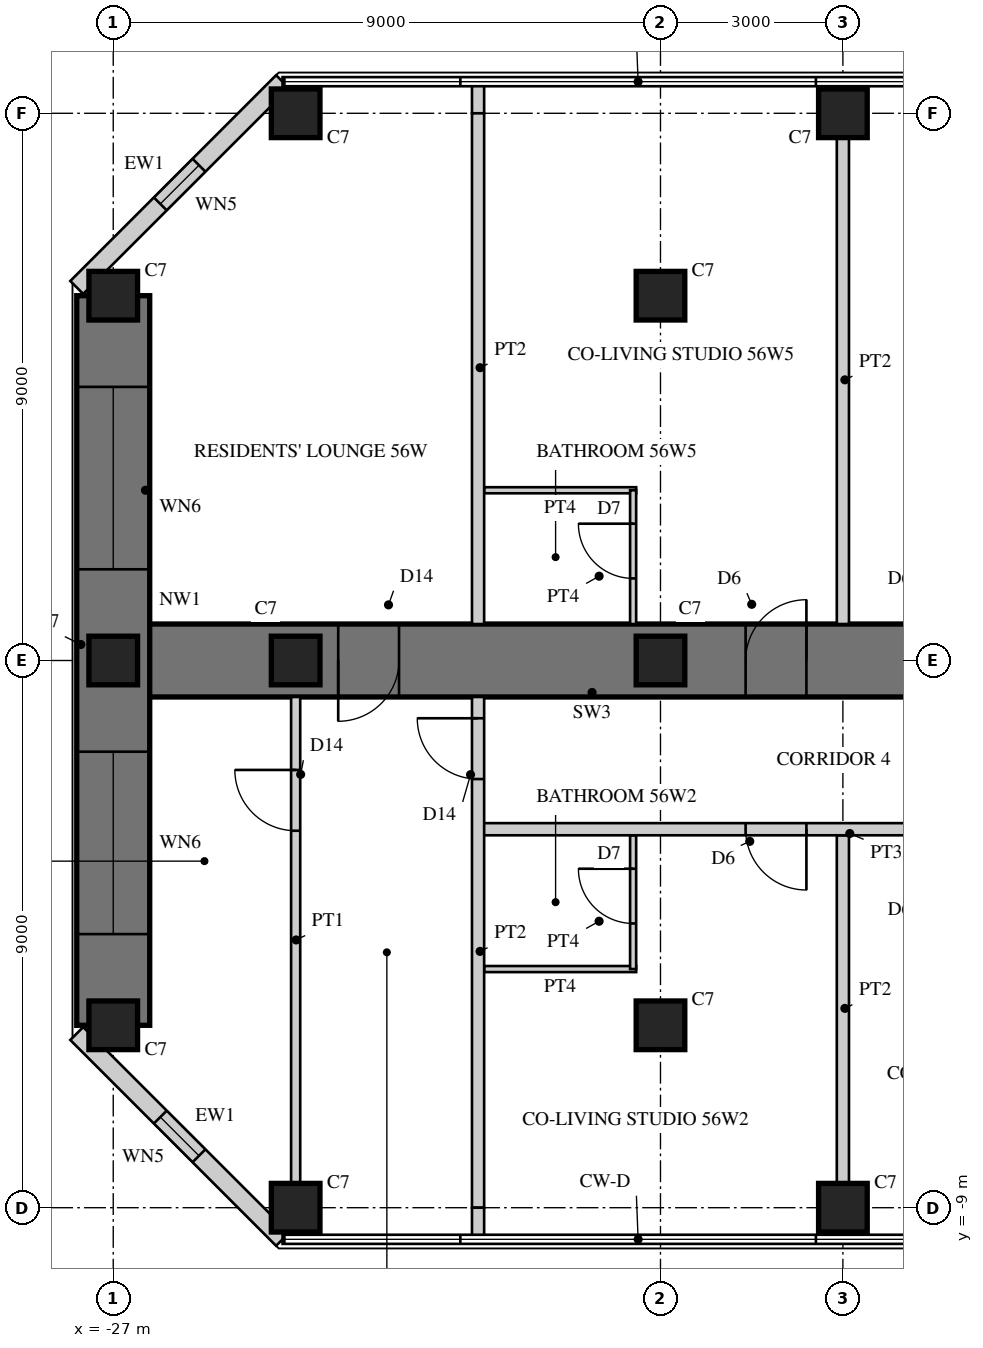
"""IFC4 building model, lengths in metres.
Left out: names, types, materials, properties, quantities, classifications, styles, units other than length and angle.
Written with IfcOpenShell. Run it as: python <this file> out.ifc"""

import sys

from ifc_helpers import new_model, si_unit, direction, frame, frame_2d, origin, origin_2d, place, context, subcontext, project, spatial, rectangle, hollow_rectangle, extrude, element, fill, save


model = new_model("IFC4")
c1 = context("Model", 3, precision=1e-05, world=origin(), true_north=direction((0.0, 1.0)))
c2 = subcontext(c1, "Body", "Model", "MODEL_VIEW")
j1 = project(units=[si_unit("LENGTHUNIT", "METRE"), si_unit("PLANEANGLEUNIT", "RADIAN")], contexts=[c1])
p1 = place(None, origin())
s1 = spatial("IfcSite", under=j1, at=p1, CompositionType="ELEMENT")
p2 = place(p1, origin())
s2 = spatial("IfcBuilding", under=s1, at=p2, CompositionType="ELEMENT")
p3 = place(p2, frame((0.0, 0.0, 222.1)))
s3 = spatial("IfcBuildingStorey", under=s2, at=p3, CompositionType="ELEMENT", Elevation=222.1)
p4 = place(p3, frame((-9.0, 0.0, 0.0), z_axis=(0.0, 0.0, 1.0), x_axis=(-1.0, 0.0, 0.0)))
e1 = element("IfcWall", 1, at=p4, inside=s3, PredefinedType="SHEAR", context=c2, shape_type="SweptSolid", body=[
    extrude(rectangle(XDim=18.0, YDim=1.2, at=frame_2d((9.0, 0.0))), origin(), (0.0, 0.0, 1.0), 3.4),
])
p5 = place(p4, frame((3.8, 0.0, 0.0)))
e2 = element("IfcOpeningElement", 2, at=p5, cuts=e1, PredefinedType="OPENING", context=c2, shape_type="SweptSolid", body=[
    extrude(rectangle(XDim=1.0, YDim=2.15, at=frame_2d((0.5, 1.075))), frame((0.0, 0.61, 0.0), z_axis=(0.0, -1.0, 0.0), x_axis=(1.0, 0.0, 0.0)), (0.0, 0.0, 1.0), 1.22),
])
p6 = place(p4, frame((6.6, 0.0, 0.0)))
e3 = element("IfcOpeningElement", 3, at=p6, cuts=e1, PredefinedType="OPENING", context=c2, shape_type="SweptSolid", body=[
    extrude(rectangle(XDim=1.0, YDim=2.15, at=frame_2d((0.5, 1.075))), frame((0.0, 0.61, 0.0), z_axis=(0.0, -1.0, 0.0), x_axis=(1.0, 0.0, 0.0)), (0.0, 0.0, 1.0), 1.22),
])
p7 = place(p4, frame((13.3, 0.0, 0.0)))
e4 = element("IfcOpeningElement", 4, at=p7, cuts=e1, PredefinedType="OPENING", context=c2, shape_type="SweptSolid", body=[
    extrude(rectangle(XDim=1.0, YDim=2.2, at=frame_2d((0.5, 1.1))), frame((0.0, 0.61, 0.0), z_axis=(0.0, -1.0, 0.0), x_axis=(1.0, 0.0, 0.0)), (0.0, 0.0, 1.0), 1.22),
])
p8 = place(p3, frame((-27.0, 6.0, 0.0), z_axis=(0.0, 0.0, 1.0), x_axis=(0.0, -1.0, 0.0)))
e5 = element("IfcWall", 5, at=p8, inside=s3, PredefinedType="SHEAR", context=c2, shape_type="SweptSolid", body=[
    extrude(rectangle(XDim=12.0, YDim=1.2, at=frame_2d((6.0, 0.0))), origin(), (0.0, 0.0, 1.0), 3.4),
])
p9 = place(p8, frame((1.5, 0.0, 0.6)))
e6 = element("IfcOpeningElement", 6, at=p9, cuts=e5, PredefinedType="OPENING", context=c2, shape_type="SweptSolid", body=[
    extrude(rectangle(XDim=3.0, YDim=2.4, at=frame_2d((1.5, 1.2))), frame((0.0, 0.61, 0.0), z_axis=(0.0, -1.0, 0.0), x_axis=(1.0, 0.0, 0.0)), (0.0, 0.0, 1.0), 1.22),
])
p10 = place(p8, frame((7.5, 0.0, 0.6)))
e7 = element("IfcOpeningElement", 7, at=p10, cuts=e5, PredefinedType="OPENING", context=c2, shape_type="SweptSolid", body=[
    extrude(rectangle(XDim=3.0, YDim=2.4, at=frame_2d((1.5, 1.2))), frame((0.0, 0.61, 0.0), z_axis=(0.0, -1.0, 0.0), x_axis=(1.0, 0.0, 0.0)), (0.0, 0.0, 1.0), 1.22),
])
for number, where, z_axis, x_axis in (
    (8, (-15.0, 9.0, 0.0), (0.0, 0.0, 1.0), (1.0, 0.0, 0.0)),
    (9, (-24.0, 9.0, 0.0), (0.0, 0.0, 1.0), (1.0, 0.0, 0.0)),
    (10, (-15.0, -9.0, 0.0), (0.0, 0.0, 1.0), (1.0, 0.0, 0.0)),
    (11, (-24.0, -9.0, 0.0), (0.0, 0.0, 1.0), (1.0, 0.0, 0.0)),
    (12, (-27.0, 6.0, 0.0), (0.0, 0.0, 1.0), (1.0, 0.0, 0.0)),
    (13, (-27.0, 0.0, 0.0), (0.0, 0.0, 1.0), (1.0, 0.0, 0.0)),
    (14, (-27.0, -6.0, 0.0), (0.0, 0.0, 1.0), (1.0, 0.0, 0.0)),
    (15, (-18.0, 6.0, 0.0), (0.0, 0.0, 1.0), (1.0, 0.0, 0.0)),
    (16, (-18.0, 0.0, 0.0), (0.0, 0.0, 1.0), (1.0, 0.0, 0.0)),
    (17, (-18.0, -6.0, 0.0), (0.0, 0.0, 1.0), (1.0, 0.0, 0.0)),
    (18, (-24.0, 0.0, 0.0), (0.0, 0.0, 1.0), (1.0, 0.0, 0.0)),
):
    element("IfcColumn", number, at=place(p3, frame(where, z_axis=z_axis, x_axis=x_axis)), inside=s3, PredefinedType="COLUMN", context=c2, shape_type="SweptSolid", body=[
        extrude(rectangle(XDim=0.8, YDim=0.8, at=origin_2d()), origin(), (0.0, 0.0, 1.0), 3.4),
    ])
p11 = place(p3, frame((-24.215, 9.52, 0.0), z_axis=(0.0, 0.0, 1.0), x_axis=(-0.707132283189, -0.707081278264, 0.0)))
e19 = element("IfcWall", 19, at=p11, inside=s3, PredefinedType="SOLIDWALL", context=c2, shape_type="SweptSolid", body=[
    extrude(rectangle(XDim=4.787, YDim=0.3, at=frame_2d((2.393, 0.0))), origin(), (0.0, 0.0, 1.0), 3.22),
])
p12 = place(p11, frame((1.943, 0.0, 0.3)))
e20 = element("IfcOpeningElement", 20, at=p12, cuts=e19, PredefinedType="OPENING", context=c2, shape_type="SweptSolid", body=[
    extrude(rectangle(XDim=0.9, YDim=2.4, at=frame_2d((0.45, 1.2))), frame((0.0, 0.16, 0.0), z_axis=(0.0, -1.0, 0.0), x_axis=(1.0, 0.0, 0.0)), (0.0, 0.0, 1.0), 0.32),
])
p13 = place(p3, frame((-27.6, -6.135, 0.0), z_axis=(0.0, 0.0, 1.0), x_axis=(0.707132283189, -0.707081278264, 0.0)))
e21 = element("IfcWall", 21, at=p13, inside=s3, PredefinedType="SOLIDWALL", context=c2, shape_type="SweptSolid", body=[
    extrude(rectangle(XDim=4.787, YDim=0.3, at=frame_2d((2.393, 0.0))), origin(), (0.0, 0.0, 1.0), 3.22),
])
p14 = place(p13, frame((1.943, 0.0, 0.3)))
e22 = element("IfcOpeningElement", 22, at=p14, cuts=e21, PredefinedType="OPENING", context=c2, shape_type="SweptSolid", body=[
    extrude(rectangle(XDim=0.9, YDim=2.4, at=frame_2d((0.45, 1.2))), frame((0.0, 0.16, 0.0), z_axis=(0.0, -1.0, 0.0), x_axis=(1.0, 0.0, 0.0)), (0.0, 0.0, 1.0), 0.32),
])
p15 = place(p3, frame((-15.0, -2.875, 0.0), z_axis=(0.0, 0.0, 1.0), x_axis=(0.0, -1.0, 0.0)))
e23 = element("IfcWall", 23, at=p15, inside=s3, PredefinedType="SOLIDWALL", context=c2, shape_type="SweptSolid", body=[
    extrude(rectangle(XDim=5.725, YDim=0.2, at=frame_2d((2.863, 0.0))), origin(), (0.0, 0.0, 1.0), 2.52),
])
p16 = place(p3, frame((-15.0, 8.6, 0.0), z_axis=(0.0, 0.0, 1.0), x_axis=(0.0, -1.0, 0.0)))
e24 = element("IfcWall", 24, at=p16, inside=s3, PredefinedType="SOLIDWALL", context=c2, shape_type="SweptSolid", body=[
    extrude(rectangle(XDim=8.0, YDim=0.2, at=frame_2d((4.0, 0.0))), origin(), (0.0, 0.0, 1.0), 2.52),
])
p17 = place(p3, frame((-18.4, -5.075, 0.0), z_axis=(0.0, 0.0, 1.0), x_axis=(-1.0, 0.0, 0.0)))
e25 = element("IfcWall", 25, at=p17, inside=s3, PredefinedType="PARTITIONING", context=c2, shape_type="SweptSolid", body=[
    extrude(rectangle(XDim=2.5, YDim=0.1, at=frame_2d((1.25, 0.0))), origin(), (0.0, 0.0, 1.0), 3.22),
])
p18 = place(p3, frame((-18.45, -2.875, 0.0), z_axis=(0.0, 0.0, 1.0), x_axis=(0.0, -1.0, 0.0)))
e26 = element("IfcWall", 26, at=p18, inside=s3, PredefinedType="PARTITIONING", context=c2, shape_type="SweptSolid", body=[
    extrude(rectangle(XDim=2.2, YDim=0.1, at=frame_2d((1.1, 0.0))), origin(), (0.0, 0.0, 1.0), 3.22),
])
p19 = place(p18, frame((0.55, 0.0, 0.0)))
e27 = element("IfcOpeningElement", 27, at=p19, cuts=e26, PredefinedType="OPENING", context=c2, shape_type="SweptSolid", body=[
    extrude(rectangle(XDim=0.9, YDim=2.1, at=frame_2d((0.45, 1.05))), frame((0.0, 0.06, 0.0), z_axis=(0.0, -1.0, 0.0), x_axis=(1.0, 0.0, 0.0)), (0.0, 0.0, 1.0), 0.12),
])
p20 = place(p3, frame((-18.4, 2.8, 0.0), z_axis=(0.0, 0.0, 1.0), x_axis=(-1.0, 0.0, 0.0)))
e28 = element("IfcWall", 28, at=p20, inside=s3, PredefinedType="PARTITIONING", context=c2, shape_type="SweptSolid", body=[
    extrude(rectangle(XDim=2.5, YDim=0.1, at=frame_2d((1.25, 0.0))), origin(), (0.0, 0.0, 1.0), 3.22),
])
p21 = place(p3, frame((-18.45, 2.8, 0.0), z_axis=(0.0, 0.0, 1.0), x_axis=(0.0, -1.0, 0.0)))
e29 = element("IfcWall", 29, at=p21, inside=s3, PredefinedType="PARTITIONING", context=c2, shape_type="SweptSolid", body=[
    extrude(rectangle(XDim=2.2, YDim=0.1, at=frame_2d((1.1, 0.0))), origin(), (0.0, 0.0, 1.0), 3.22),
])
p22 = place(p21, frame((0.55, 0.0, 0.0)))
e30 = element("IfcOpeningElement", 30, at=p22, cuts=e29, PredefinedType="OPENING", context=c2, shape_type="SweptSolid", body=[
    extrude(rectangle(XDim=0.9, YDim=2.1, at=frame_2d((0.45, 1.05))), frame((0.0, 0.06, 0.0), z_axis=(0.0, -1.0, 0.0), x_axis=(1.0, 0.0, 0.0)), (0.0, 0.0, 1.0), 0.12),
])
p23 = place(p3, frame((-9.4, -2.775, 0.0), z_axis=(0.0, 0.0, 1.0), x_axis=(-1.0, 0.0, 0.0)))
e31 = element("IfcWall", 31, at=p23, inside=s3, PredefinedType="SOLIDWALL", context=c2, shape_type="SweptSolid", body=[
    extrude(rectangle(XDim=11.6, YDim=0.2, at=frame_2d((5.8, 0.0))), origin(), (0.0, 0.0, 1.0), 3.22),
])
p24 = place(p23, frame((3.4, 0.0, 0.0)))
e32 = element("IfcOpeningElement", 32, at=p24, cuts=e31, PredefinedType="OPENING", context=c2, shape_type="SweptSolid", body=[
    extrude(rectangle(XDim=1.0, YDim=2.15, at=frame_2d((0.5, 1.075))), frame((0.0, 0.11, 0.0), z_axis=(0.0, -1.0, 0.0), x_axis=(1.0, 0.0, 0.0)), (0.0, 0.0, 1.0), 0.22),
])
p25 = place(p23, frame((6.2, 0.0, 0.0)))
e33 = element("IfcOpeningElement", 33, at=p25, cuts=e31, PredefinedType="OPENING", context=c2, shape_type="SweptSolid", body=[
    extrude(rectangle(XDim=1.0, YDim=2.15, at=frame_2d((0.5, 1.075))), frame((0.0, 0.11, 0.0), z_axis=(0.0, -1.0, 0.0), x_axis=(1.0, 0.0, 0.0)), (0.0, 0.0, 1.0), 0.22),
])
p26 = place(p3, frame((-24.0, -0.6, 0.0), z_axis=(0.0, 0.0, 1.0), x_axis=(0.0, -1.0, 0.0)))
e34 = element("IfcWall", 34, at=p26, inside=s3, PredefinedType="PARTITIONING", context=c2, shape_type="SweptSolid", body=[
    extrude(rectangle(XDim=8.0, YDim=0.15, at=frame_2d((4.0, 0.0))), origin(), (0.0, 0.0, 1.0), 2.52),
])
p27 = place(p26, frame((1.2, 0.0, 0.0)))
e35 = element("IfcOpeningElement", 35, at=p27, cuts=e34, PredefinedType="OPENING", context=c2, shape_type="SweptSolid", body=[
    extrude(rectangle(XDim=1.0, YDim=2.2, at=frame_2d((0.5, 1.1))), frame((0.0, 0.085, 0.0), z_axis=(0.0, -1.0, 0.0), x_axis=(1.0, 0.0, 0.0)), (0.0, 0.0, 1.0), 0.17),
])
p28 = place(p3, frame((-21.0, 9.48, 0.0), z_axis=(0.0, 0.0, 1.0), x_axis=(0.0, -1.0, 0.0)))
e36 = element("IfcWall", 36, at=p28, inside=s3, PredefinedType="SOLIDWALL", context=c2, shape_type="SweptSolid", body=[
    extrude(rectangle(XDim=0.48, YDim=0.2, at=frame_2d((0.24, 0.0))), origin(), (0.0, 0.0, 1.0), 3.22),
])
p29 = place(p3, frame((-21.0, 9.0, 0.0), z_axis=(0.0, 0.0, 1.0), x_axis=(0.0, -1.0, 0.0)))
e37 = element("IfcWall", 37, at=p29, inside=s3, PredefinedType="SOLIDWALL", context=c2, shape_type="SweptSolid", body=[
    extrude(rectangle(XDim=8.4, YDim=0.2, at=frame_2d((4.2, 0.0))), origin(), (0.0, 0.0, 1.0), 2.67),
])
p30 = place(p3, frame((-21.0, -0.6, 0.0), z_axis=(0.0, 0.0, 1.0), x_axis=(0.0, -1.0, 0.0)))
e38 = element("IfcWall", 38, at=p30, inside=s3, PredefinedType="SOLIDWALL", context=c2, shape_type="SweptSolid", body=[
    extrude(rectangle(XDim=8.4, YDim=0.2, at=frame_2d((4.2, 0.0))), origin(), (0.0, 0.0, 1.0), 2.67),
])
p31 = place(p30, frame((0.35, 0.0, 0.0)))
e39 = element("IfcOpeningElement", 39, at=p31, cuts=e38, PredefinedType="OPENING", context=c2, shape_type="SweptSolid", body=[
    extrude(rectangle(XDim=1.0, YDim=2.2, at=frame_2d((0.5, 1.1))), frame((0.0, 0.11, 0.0), z_axis=(0.0, -1.0, 0.0), x_axis=(1.0, 0.0, 0.0)), (0.0, 0.0, 1.0), 0.22),
])
p32 = place(p3, frame((-21.0, -9.0, 0.0), z_axis=(0.0, 0.0, 1.0), x_axis=(0.0, -1.0, 0.0)))
e40 = element("IfcWall", 40, at=p32, inside=s3, PredefinedType="SOLIDWALL", context=c2, shape_type="SweptSolid", body=[
    extrude(rectangle(XDim=0.48, YDim=0.2, at=frame_2d((0.24, 0.0))), origin(), (0.0, 0.0, 1.0), 3.22),
])
p33 = place(p12, origin())
e41 = element("IfcWindow", 41, at=p33, inside=s3, PartitioningType="SINGLE_PANEL", PredefinedType="WINDOW", context=c2, shape_type="SweptSolid", body=[
    extrude(hollow_rectangle(XDim=0.9, YDim=2.4, WallThickness=0.06, at=frame_2d((0.45, 1.2))), frame((0.0, 0.03, 0.0), z_axis=(0.0, -1.0, 0.0), x_axis=(1.0, 0.0, 0.0)), (0.0, 0.0, 1.0), 0.06),
    extrude(rectangle(XDim=0.779, YDim=2.279, at=frame_2d((0.45, 1.2))), frame((0.0, 0.03, 0.0), z_axis=(0.0, -1.0, 0.0), x_axis=(1.0, 0.0, 0.0)), (0.0, 0.0, 1.0), 0.06),
])
fill(e20, e41)
p34 = place(p9, origin())
e42 = element("IfcWindow", 42, at=p34, inside=s3, PartitioningType="SINGLE_PANEL", PredefinedType="WINDOW", context=c2, shape_type="SweptSolid", body=[
    extrude(hollow_rectangle(XDim=3.0, YDim=2.4, WallThickness=0.06, at=frame_2d((1.5, 1.2))), frame((0.0, 0.03, 0.0), z_axis=(0.0, -1.0, 0.0), x_axis=(1.0, 0.0, 0.0)), (0.0, 0.0, 1.0), 0.06),
    extrude(rectangle(XDim=2.879, YDim=2.279, at=frame_2d((1.5, 1.2))), frame((0.0, 0.03, 0.0), z_axis=(0.0, -1.0, 0.0), x_axis=(1.0, 0.0, 0.0)), (0.0, 0.0, 1.0), 0.06),
])
fill(e6, e42)
p35 = place(p10, origin())
e43 = element("IfcWindow", 43, at=p35, inside=s3, PartitioningType="SINGLE_PANEL", PredefinedType="WINDOW", context=c2, shape_type="SweptSolid", body=[
    extrude(hollow_rectangle(XDim=3.0, YDim=2.4, WallThickness=0.06, at=frame_2d((1.5, 1.2))), frame((0.0, 0.03, 0.0), z_axis=(0.0, -1.0, 0.0), x_axis=(1.0, 0.0, 0.0)), (0.0, 0.0, 1.0), 0.06),
    extrude(rectangle(XDim=2.879, YDim=2.279, at=frame_2d((1.5, 1.2))), frame((0.0, 0.03, 0.0), z_axis=(0.0, -1.0, 0.0), x_axis=(1.0, 0.0, 0.0)), (0.0, 0.0, 1.0), 0.06),
])
fill(e7, e43)
p36 = place(p14, origin())
e44 = element("IfcWindow", 44, at=p36, inside=s3, PartitioningType="SINGLE_PANEL", PredefinedType="WINDOW", context=c2, shape_type="SweptSolid", body=[
    extrude(hollow_rectangle(XDim=0.9, YDim=2.4, WallThickness=0.06, at=frame_2d((0.45, 1.2))), frame((0.0, 0.03, 0.0), z_axis=(0.0, -1.0, 0.0), x_axis=(1.0, 0.0, 0.0)), (0.0, 0.0, 1.0), 0.06),
    extrude(rectangle(XDim=0.779, YDim=2.279, at=frame_2d((0.45, 1.2))), frame((0.0, 0.03, 0.0), z_axis=(0.0, -1.0, 0.0), x_axis=(1.0, 0.0, 0.0)), (0.0, 0.0, 1.0), 0.06),
])
fill(e22, e44)
p37 = place(p19, frame((0.9, 0.0, 0.0), z_axis=(0.0, 0.0, 1.0), x_axis=(-1.0, 0.0, 0.0)))
e45 = element("IfcDoor", 45, at=p37, inside=s3, OperationType="SINGLE_SWING_RIGHT", PredefinedType="DOOR", context=c2, shape_type="SweptSolid", body=[
    extrude(rectangle(XDim=0.9, YDim=2.1, at=frame_2d((0.45, 1.05))), frame((0.0, 0.025, 0.0), z_axis=(0.0, -1.0, 0.0), x_axis=(1.0, 0.0, 0.0)), (0.0, 0.0, 1.0), 0.05),
])
fill(e27, e45)
p38 = place(p22, frame((0.9, 0.0, 0.0), z_axis=(0.0, 0.0, 1.0), x_axis=(-1.0, 0.0, 0.0)))
e46 = element("IfcDoor", 46, at=p38, inside=s3, OperationType="SINGLE_SWING_RIGHT", PredefinedType="DOOR", context=c2, shape_type="SweptSolid", body=[
    extrude(rectangle(XDim=0.9, YDim=2.1, at=frame_2d((0.45, 1.05))), frame((0.0, 0.025, 0.0), z_axis=(0.0, -1.0, 0.0), x_axis=(1.0, 0.0, 0.0)), (0.0, 0.0, 1.0), 0.05),
])
fill(e30, e46)
p39 = place(p25, origin())
e47 = element("IfcDoor", 47, at=p39, inside=s3, OperationType="SINGLE_SWING_LEFT", PredefinedType="DOOR", context=c2, shape_type="SweptSolid", body=[
    extrude(rectangle(XDim=1.0, YDim=2.15, at=frame_2d((0.5, 1.075))), frame((0.0, 0.025, 0.0), z_axis=(0.0, -1.0, 0.0), x_axis=(1.0, 0.0, 0.0)), (0.0, 0.0, 1.0), 0.05),
])
fill(e33, e47)
p40 = place(p27, frame((1.0, 0.0, 0.0), z_axis=(0.0, 0.0, 1.0), x_axis=(-1.0, 0.0, 0.0)))
e48 = element("IfcDoor", 48, at=p40, inside=s3, OperationType="SINGLE_SWING_RIGHT", PredefinedType="DOOR", context=c2, shape_type="SweptSolid", body=[
    extrude(rectangle(XDim=1.0, YDim=2.2, at=frame_2d((0.5, 1.1))), frame((0.0, 0.025, 0.0), z_axis=(0.0, -1.0, 0.0), x_axis=(1.0, 0.0, 0.0)), (0.0, 0.0, 1.0), 0.05),
])
fill(e35, e48)
p41 = place(p31, frame((1.0, 0.0, 0.0), z_axis=(0.0, 0.0, 1.0), x_axis=(-1.0, 0.0, 0.0)))
e49 = element("IfcDoor", 49, at=p41, inside=s3, OperationType="SINGLE_SWING_RIGHT", PredefinedType="DOOR", context=c2, shape_type="SweptSolid", body=[
    extrude(rectangle(XDim=1.0, YDim=2.2, at=frame_2d((0.5, 1.1))), frame((0.0, 0.025, 0.0), z_axis=(0.0, -1.0, 0.0), x_axis=(1.0, 0.0, 0.0)), (0.0, 0.0, 1.0), 0.05),
])
fill(e39, e49)
p42 = place(p6, frame((1.0, 0.0, 0.0), z_axis=(0.0, 0.0, 1.0), x_axis=(-1.0, 0.0, 0.0)))
e50 = element("IfcDoor", 50, at=p42, inside=s3, OperationType="SINGLE_SWING_RIGHT", PredefinedType="DOOR", context=c2, shape_type="SweptSolid", body=[
    extrude(rectangle(XDim=1.0, YDim=2.15, at=frame_2d((0.5, 1.075))), frame((0.0, 0.025, 0.0), z_axis=(0.0, -1.0, 0.0), x_axis=(1.0, 0.0, 0.0)), (0.0, 0.0, 1.0), 0.05),
])
fill(e3, e50)
p43 = place(p7, origin())
e51 = element("IfcDoor", 51, at=p43, inside=s3, OperationType="SINGLE_SWING_RIGHT", PredefinedType="DOOR", context=c2, shape_type="SweptSolid", body=[
    extrude(rectangle(XDim=1.0, YDim=2.2, at=frame_2d((0.5, 1.1))), frame((0.0, 0.025, 0.0), z_axis=(0.0, -1.0, 0.0), x_axis=(1.0, 0.0, 0.0)), (0.0, 0.0, 1.0), 0.05),
])
fill(e4, e51)
save(model, sys.argv[1])
